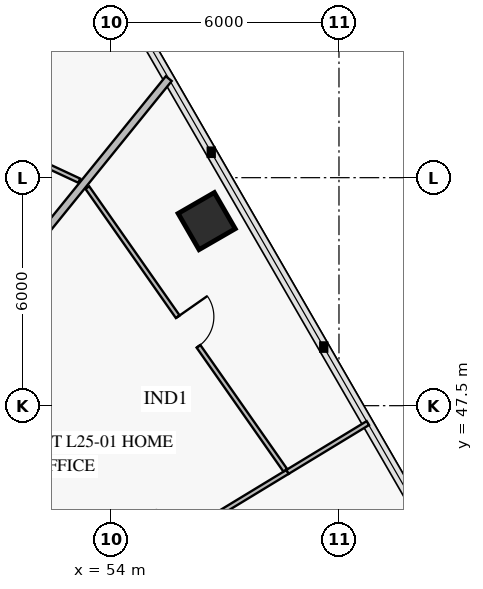
"""IFC4 building model, lengths in metres.
Left out: names, types, materials, properties, quantities, classifications, styles, units other than length and angle.
Written with IfcOpenShell. Run it as: python <this file> out.ifc"""

import sys

from ifc_helpers import new_model, si_unit, direction, frame, frame_2d, origin, origin_2d, place, context, subcontext, project, spatial, rectangle, extrude, element, fill, save


model = new_model("IFC4")
c1 = context("Model", 3, precision=1e-05, world=origin(), true_north=direction((0.0, 1.0)))
c2 = subcontext(c1, "Body", "Model", "MODEL_VIEW")
j1 = project(units=[si_unit("LENGTHUNIT", "METRE"), si_unit("PLANEANGLEUNIT", "RADIAN")], contexts=[c1])
p1 = place(None, origin())
s1 = spatial("IfcSite", under=j1, at=p1, CompositionType="ELEMENT")
p2 = place(p1, origin())
s2 = spatial("IfcBuilding", under=s1, at=p2, CompositionType="ELEMENT")
p3 = place(p2, frame((0.0, 0.0, 103.8)))
s3 = spatial("IfcBuildingStorey", under=s2, at=p3, CompositionType="ELEMENT", Elevation=103.8)
p4 = place(p3, frame((56.519, 52.357, 0.0), z_axis=(0.0, 0.0, 1.0), x_axis=(-0.5, 0.866025403784, 0.0)))
e1 = element("IfcColumn", 1, at=p4, inside=s3, PredefinedType="COLUMN", context=c2, shape_type="SweptSolid", body=[
    extrude(rectangle(XDim=1.1, YDim=1.1, at=origin_2d()), origin(), (0.0, 0.0, 1.0), 3.55),
])
p5 = place(p3, frame((51.944, 41.686, 0.0), z_axis=(0.0, 0.0, 1.0), x_axis=(0.854642479396, 0.519216941569, 0.0)))
e2 = element("IfcWall", 2, at=p5, inside=s3, PredefinedType="PARTITIONING", context=c2, shape_type="SweptSolid", body=[
    extrude(rectangle(XDim=7.843, YDim=0.12, at=frame_2d((3.921, 0.0))), origin(), (0.0, 0.0, 1.0), 3.1),
])
p6 = place(p5, frame((3.421, 0.0, 0.0)))
e3 = element("IfcOpeningElement", 3, at=p6, cuts=e2, PredefinedType="OPENING", context=c2, shape_type="SweptSolid", body=[
    extrude(rectangle(XDim=0.95, YDim=2.1, at=frame_2d((0.475, 1.05))), frame((0.0, 0.072, 0.0), z_axis=(0.0, -1.0, 0.0), x_axis=(1.0, 0.0, 0.0)), (0.0, 0.0, 1.0), 0.144),
])
p7 = place(p3, frame((58.586, 45.801, 0.0), z_axis=(0.0, 0.0, 1.0), x_axis=(-0.573574227098, 0.81915359122, 0.0)))
e4 = element("IfcWall", 4, at=p7, inside=s3, PredefinedType="PARTITIONING", context=c2, shape_type="SweptSolid", body=[
    extrude(rectangle(XDim=9.08, YDim=0.12, at=frame_2d((4.54, 0.0))), origin(), (0.0, 0.0, 1.0), 2.85),
])
p8 = place(p7, frame((3.98, 0.0, 0.0)))
e5 = element("IfcOpeningElement", 5, at=p8, cuts=e4, PredefinedType="OPENING", context=c2, shape_type="SweptSolid", body=[
    extrude(rectangle(XDim=0.95, YDim=2.1, at=frame_2d((0.475, 1.05))), frame((0.0, 0.072, 0.0), z_axis=(0.0, -1.0, 0.0), x_axis=(1.0, 0.0, 0.0)), (0.0, 0.0, 1.0), 0.144),
])
p9 = place(p3, frame((53.166, 53.42, 0.0), z_axis=(0.0, 0.0, 1.0), x_axis=(-0.906301834907, 0.422631025889, 0.0)))
e6 = element("IfcWall", 6, at=p9, inside=s3, PredefinedType="PARTITIONING", context=c2, shape_type="SweptSolid", body=[
    extrude(rectangle(XDim=5.096, YDim=0.12, at=frame_2d((2.548, 0.0))), origin(), (0.0, 0.0, 1.0), 3.55),
])
p10 = place(p9, frame((2.073, 0.0, 0.0)))
e7 = element("IfcOpeningElement", 7, at=p10, cuts=e6, PredefinedType="OPENING", context=c2, shape_type="SweptSolid", body=[
    extrude(rectangle(XDim=0.95, YDim=2.1, at=frame_2d((0.475, 1.05))), frame((0.0, 0.072, 0.0), z_axis=(0.0, -1.0, 0.0), x_axis=(1.0, 0.0, 0.0)), (0.0, 0.0, 1.0), 0.144),
])
p11 = place(p3, frame((58.646, 45.758, 0.0), z_axis=(0.0, 0.0, 1.0), x_axis=(0.854604427489, 0.519279570672, 0.0)))
e8 = element("IfcWall", 8, at=p11, inside=s3, PredefinedType="PARTITIONING", context=c2, shape_type="SweptSolid", body=[
    extrude(rectangle(XDim=2.472, YDim=0.12, at=frame_2d((1.236, 0.0))), origin(), (0.0, 0.0, 1.0), 2.8),
])
p12 = place(p3, frame((45.75, 44.04, 0.0), z_axis=(0.0, 0.0, 1.0), x_axis=(0.629320806321, 0.777145625177, 0.0)))
e9 = element("IfcWall", 9, at=p12, inside=s3, PredefinedType="PARTITIONING", context=c2, shape_type="SweptSolid", body=[
    extrude(rectangle(XDim=15.526, YDim=0.2, at=frame_2d((7.763, 0.0))), origin(), (0.0, 0.0, 1.0), 2.8),
])
p13 = place(p8, frame((0.95, 0.0, 0.0), z_axis=(0.0, 0.0, 1.0), x_axis=(-1.0, 0.0, 0.0)))
e10 = element("IfcDoor", 10, at=p13, inside=s3, OperationType="SINGLE_SWING_LEFT", PredefinedType="DOOR", context=c2, shape_type="SweptSolid", body=[
    extrude(rectangle(XDim=0.95, YDim=2.1, at=frame_2d((0.475, 1.05))), frame((0.0, 0.025, 0.0), z_axis=(0.0, -1.0, 0.0), x_axis=(1.0, 0.0, 0.0)), (0.0, 0.0, 1.0), 0.05),
])
fill(e5, e10)
save(model, sys.argv[1])
